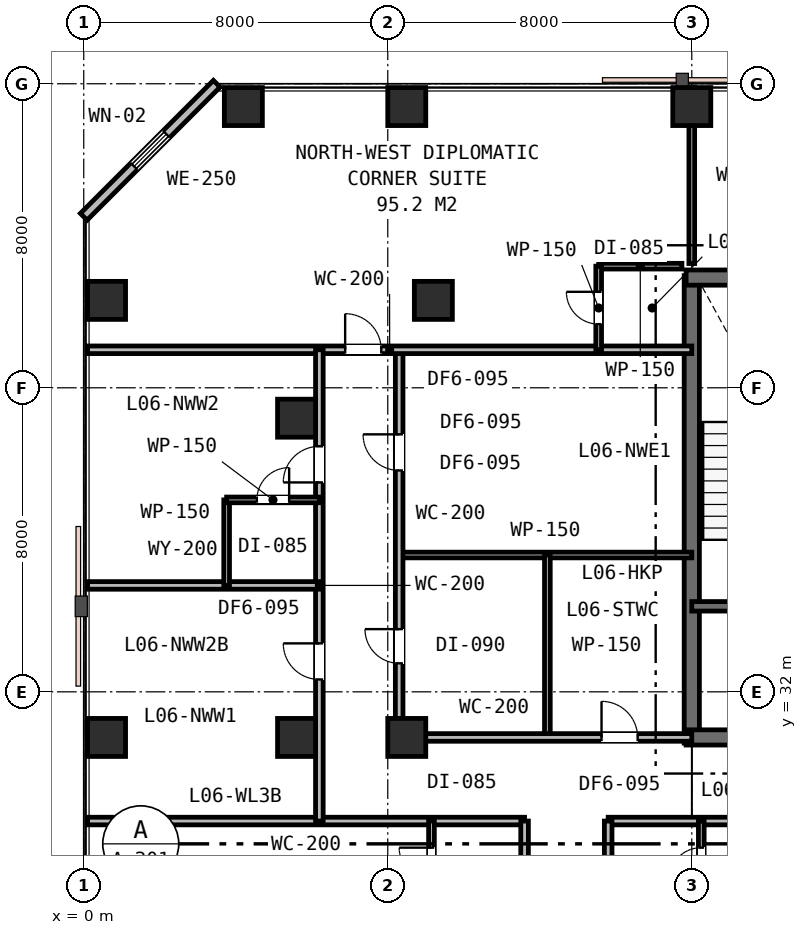
"""IFC4 building model, lengths in metres.
Left out: names, types, materials, properties, quantities, classifications, styles, units other than length and angle.
Written with IfcOpenShell. Run it as: python <this file> out.ifc"""

import sys

from ifc_helpers import new_model, si_unit, direction, frame, frame_2d, origin, origin_2d, place, context, subcontext, project, spatial, rectangle, extrude, element, fill, save


model = new_model("IFC4")
c1 = context("Model", 3, precision=1e-05, world=origin(), true_north=direction((0.0, 1.0)))
c2 = subcontext(c1, "Body", "Model", "MODEL_VIEW")
j1 = project(units=[si_unit("LENGTHUNIT", "METRE"), si_unit("PLANEANGLEUNIT", "RADIAN")], contexts=[c1])
p1 = place(None, origin())
s1 = spatial("IfcSite", under=j1, at=p1, CompositionType="ELEMENT")
p2 = place(p1, origin())
s2 = spatial("IfcBuilding", under=s1, at=p2, CompositionType="ELEMENT")
p3 = place(p2, frame((0.0, 0.0, 29.4)))
s3 = spatial("IfcBuildingStorey", under=s2, at=p3, CompositionType="ELEMENT", Elevation=29.4)
p4 = place(p3, frame((16.0, 30.65, 0.0), z_axis=(0.0, 0.0, 1.0), x_axis=(0.0, 1.0, 0.0)))
e1 = element("IfcWall", 1, at=p4, inside=s3, PredefinedType="SHEAR", context=c2, shape_type="SweptSolid", body=[
    extrude(rectangle(XDim=12.3, YDim=0.4, at=frame_2d((6.15, 0.0))), origin(), (0.0, 0.0, 1.0), 3.6),
])
p5 = place(p3, frame((15.85, 42.9, 0.0), z_axis=(0.0, 0.0, 1.0), x_axis=(1.0, 0.0, 0.0)))
e2 = element("IfcWall", 2, at=p5, inside=s3, PredefinedType="SHEAR", context=c2, shape_type="SweptSolid", body=[
    extrude(rectangle(XDim=24.3, YDim=0.4, at=frame_2d((12.15, 0.0))), origin(), (0.0, 0.0, 1.0), 3.6),
])
p6 = place(p3, frame((15.85, 30.8, 0.0), z_axis=(0.0, 0.0, 1.0), x_axis=(1.0, 0.0, 0.0)))
e3 = element("IfcWall", 3, at=p6, inside=s3, PredefinedType="SHEAR", context=c2, shape_type="SweptSolid", body=[
    extrude(rectangle(XDim=11.2, YDim=0.4, at=frame_2d((5.6, 0.0))), origin(), (0.0, 0.0, 1.0), 3.6),
])
p7 = place(p6, frame((2.45, 0.0, 0.0)))
e4 = element("IfcOpeningElement", 4, at=p7, cuts=e3, PredefinedType="OPENING", context=c2, shape_type="SweptSolid", body=[
    extrude(rectangle(XDim=1.1, YDim=2.15, at=frame_2d((0.55, 1.075))), frame((0.0, 0.21, 0.0), z_axis=(0.0, -1.0, 0.0), x_axis=(1.0, 0.0, 0.0)), (0.0, 0.0, 1.0), 0.42),
])
p8 = place(p3, frame((16.0, 34.25, 0.0), z_axis=(0.0, 0.0, 1.0), x_axis=(1.0, 0.0, 0.0)))
e5 = element("IfcWall", 5, at=p8, inside=s3, PredefinedType="SHEAR", context=c2, shape_type="SweptSolid", body=[
    extrude(rectangle(XDim=6.05, YDim=0.25, at=frame_2d((3.025, 0.0))), origin(), (0.0, 0.0, 1.0), 3.6),
])
p9 = place(p8, frame((1.25, 0.0, 0.0)))
e6 = element("IfcOpeningElement", 6, at=p9, cuts=e5, PredefinedType="OPENING", context=c2, shape_type="SweptSolid", body=[
    extrude(rectangle(XDim=1.0, YDim=2.15, at=frame_2d((0.5, 1.075))), frame((0.0, 0.135, 0.0), z_axis=(0.0, -1.0, 0.0), x_axis=(1.0, 0.0, 0.0)), (0.0, 0.0, 1.0), 0.27),
])
p10 = place(p8, frame((4.2, 0.0, 0.0)))
e7 = element("IfcOpeningElement", 7, at=p10, cuts=e5, PredefinedType="OPENING", context=c2, shape_type="SweptSolid", body=[
    extrude(rectangle(XDim=1.1, YDim=2.15, at=frame_2d((0.55, 1.075))), frame((0.0, 0.135, 0.0), z_axis=(0.0, -1.0, 0.0), x_axis=(1.0, 0.0, 0.0)), (0.0, 0.0, 1.0), 0.27),
])
for number, where, z_axis, x_axis in (
    (8, (5.6, 30.8, 0.0), (0.0, 0.0, 1.0), (1.0, 0.0, 0.0)),
    (9, (5.6, 39.2, 0.0), (0.0, 0.0, 1.0), (1.0, 0.0, 0.0)),
    (10, (8.5, 30.8, 0.0), (0.0, 0.0, 1.0), (1.0, 0.0, 0.0)),
    (11, (9.2, 42.3, 0.0), (0.0, 0.0, 1.0), (1.0, 0.0, 0.0)),
    (12, (0.6, 30.8, 0.0), (0.0, 0.0, 1.0), (1.0, 0.0, 0.0)),
    (13, (0.6, 42.3, 0.0), (0.0, 0.0, 1.0), (1.0, 0.0, 0.0)),
    (14, (4.2, 47.4, 0.0), (0.0, 0.0, 1.0), (1.0, 0.0, 0.0)),
    (15, (8.5, 47.4, 0.0), (0.0, 0.0, 1.0), (1.0, 0.0, 0.0)),
    (16, (16.0, 47.4, 0.0), (0.0, 0.0, 1.0), (1.0, 0.0, 0.0)),
):
    element("IfcColumn", number, at=place(p3, frame(where, z_axis=z_axis, x_axis=x_axis)), inside=s3, PredefinedType="COLUMN", context=c2, shape_type="SweptSolid", body=[
        extrude(rectangle(XDim=1.0, YDim=1.0, at=origin_2d()), origin(), (0.0, 0.0, 1.0), 3.6),
    ])
p11 = place(p3, frame((3.5, 48.0, 0.0), z_axis=(0.0, 0.0, 1.0), x_axis=(-0.707106781187, -0.707106781187, 0.0)))
e17 = element("IfcWall", 17, at=p11, inside=s3, PredefinedType="STANDARD", context=c2, shape_type="SweptSolid", body=[
    extrude(rectangle(XDim=4.95, YDim=0.25, at=frame_2d((2.475, 0.0))), origin(), (0.0, 0.0, 1.0), 3.33),
])
p12 = place(p11, frame((1.875, 0.0, 0.85)))
e18 = element("IfcOpeningElement", 18, at=p12, cuts=e17, PredefinedType="OPENING", context=c2, shape_type="SweptSolid", body=[
    extrude(rectangle(XDim=1.2, YDim=1.6, at=frame_2d((0.6, 0.8))), frame((0.0, 0.135, 0.0), z_axis=(0.0, -1.0, 0.0), x_axis=(1.0, 0.0, 0.0)), (0.0, 0.0, 1.0), 0.27),
])
p13 = place(p3, frame((0.1, 28.6, 0.0), z_axis=(0.0, 0.0, 1.0), x_axis=(1.0, 0.0, 0.0)))
e19 = element("IfcWall", 19, at=p13, inside=s3, PredefinedType="PARTITIONING", context=c2, shape_type="SweptSolid", body=[
    extrude(rectangle(XDim=11.5, YDim=0.2, at=frame_2d((5.75, 0.0))), origin(), (0.0, 0.0, 1.0), 2.68),
])
p14 = place(p3, frame((13.8, 28.6, 0.0), z_axis=(0.0, 0.0, 1.0), x_axis=(1.0, 0.0, 0.0)))
e20 = element("IfcWall", 20, at=p14, inside=s3, PredefinedType="PARTITIONING", context=c2, shape_type="SweptSolid", body=[
    extrude(rectangle(XDim=36.6, YDim=0.2, at=frame_2d((18.3, 0.0))), origin(), (0.0, 0.0, 1.0), 2.68),
])
p15 = place(p14, frame((12.3, 0.0, 0.0)))
e21 = element("IfcOpeningElement", 21, at=p15, cuts=e20, PredefinedType="OPENING", context=c2, shape_type="SweptSolid", body=[
    extrude(rectangle(XDim=0.95, YDim=2.15, at=frame_2d((0.475, 1.075))), frame((0.0, 0.11, 0.0), z_axis=(0.0, -1.0, 0.0), x_axis=(1.0, 0.0, 0.0)), (0.0, 0.0, 1.0), 0.22),
])
p16 = place(p14, frame((20.075, 0.0, 0.0)))
e22 = element("IfcOpeningElement", 22, at=p16, cuts=e20, PredefinedType="OPENING", context=c2, shape_type="SweptSolid", body=[
    extrude(rectangle(XDim=0.95, YDim=2.15, at=frame_2d((0.475, 1.075))), frame((0.0, 0.11, 0.0), z_axis=(0.0, -1.0, 0.0), x_axis=(1.0, 0.0, 0.0)), (0.0, 0.0, 1.0), 0.22),
])
p17 = place(p14, frame((26.829, 0.0, 0.0)))
e23 = element("IfcOpeningElement", 23, at=p17, cuts=e20, PredefinedType="OPENING", context=c2, shape_type="SweptSolid", body=[
    extrude(rectangle(XDim=0.95, YDim=2.15, at=frame_2d((0.475, 1.075))), frame((0.0, 0.11, 0.0), z_axis=(0.0, -1.0, 0.0), x_axis=(1.0, 0.0, 0.0)), (0.0, 0.0, 1.0), 0.22),
])
p18 = place(p14, frame((32.669, 0.0, 0.0)))
e24 = element("IfcOpeningElement", 24, at=p18, cuts=e20, PredefinedType="OPENING", context=c2, shape_type="SweptSolid", body=[
    extrude(rectangle(XDim=0.95, YDim=2.15, at=frame_2d((0.475, 1.075))), frame((0.0, 0.11, 0.0), z_axis=(0.0, -1.0, 0.0), x_axis=(1.0, 0.0, 0.0)), (0.0, 0.0, 1.0), 0.22),
])
p19 = place(p3, frame((8.3, 35.6, 0.0), z_axis=(0.0, 0.0, 1.0), x_axis=(1.0, 0.0, 0.0)))
e25 = element("IfcWall", 25, at=p19, inside=s3, PredefinedType="PARTITIONING", context=c2, shape_type="SweptSolid", body=[
    extrude(rectangle(XDim=7.7, YDim=0.15, at=frame_2d((3.85, 0.0))), origin(), (0.0, 0.0, 1.0), 2.68),
])
p20 = place(p3, frame((12.2, 30.8, 0.0), z_axis=(0.0, 0.0, 1.0), x_axis=(0.0, 1.0, 0.0)))
e26 = element("IfcWall", 26, at=p20, inside=s3, PredefinedType="PARTITIONING", context=c2, shape_type="SweptSolid", body=[
    extrude(rectangle(XDim=4.8, YDim=0.15, at=frame_2d((2.4, 0.0))), origin(), (0.0, 0.0, 1.0), 2.68),
])
p21 = place(p3, frame((8.3, 30.8, 0.0), z_axis=(0.0, 0.0, 1.0), x_axis=(1.0, 0.0, 0.0)))
e27 = element("IfcWall", 27, at=p21, inside=s3, PredefinedType="PARTITIONING", context=c2, shape_type="SweptSolid", body=[
    extrude(rectangle(XDim=7.7, YDim=0.2, at=frame_2d((3.85, 0.0))), origin(), (0.0, 0.0, 1.0), 2.68),
])
p22 = place(p21, frame((5.325, 0.0, 0.0)))
e28 = element("IfcOpeningElement", 28, at=p22, cuts=e27, PredefinedType="OPENING", context=c2, shape_type="SweptSolid", body=[
    extrude(rectangle(XDim=0.95, YDim=2.15, at=frame_2d((0.475, 1.075))), frame((0.0, 0.11, 0.0), z_axis=(0.0, -1.0, 0.0), x_axis=(1.0, 0.0, 0.0)), (0.0, 0.0, 1.0), 0.22),
])
p23 = place(p3, frame((8.3, 30.8, 0.0), z_axis=(0.0, 0.0, 1.0), x_axis=(0.0, 1.0, 0.0)))
e29 = element("IfcWall", 29, at=p23, inside=s3, PredefinedType="PARTITIONING", context=c2, shape_type="SweptSolid", body=[
    extrude(rectangle(XDim=10.2, YDim=0.2, at=frame_2d((5.1, 0.0))), origin(), (0.0, 0.0, 1.0), 2.68),
])
p24 = place(p23, frame((1.95, 0.0, 0.0)))
e30 = element("IfcOpeningElement", 30, at=p24, cuts=e29, PredefinedType="OPENING", context=c2, shape_type="SweptSolid", body=[
    extrude(rectangle(XDim=0.9, YDim=2.15, at=frame_2d((0.45, 1.075))), frame((0.0, 0.11, 0.0), z_axis=(0.0, -1.0, 0.0), x_axis=(1.0, 0.0, 0.0)), (0.0, 0.0, 1.0), 0.22),
])
p25 = place(p23, frame((7.025, 0.0, 0.0)))
e31 = element("IfcOpeningElement", 31, at=p25, cuts=e29, PredefinedType="OPENING", context=c2, shape_type="SweptSolid", body=[
    extrude(rectangle(XDim=0.95, YDim=2.15, at=frame_2d((0.475, 1.075))), frame((0.0, 0.11, 0.0), z_axis=(0.0, -1.0, 0.0), x_axis=(1.0, 0.0, 0.0)), (0.0, 0.0, 1.0), 0.22),
])
p26 = place(p3, frame((0.1, 41.0, 0.0), z_axis=(0.0, 0.0, 1.0), x_axis=(1.0, 0.0, 0.0)))
e32 = element("IfcWall", 32, at=p26, inside=s3, PredefinedType="PARTITIONING", context=c2, shape_type="SweptSolid", body=[
    extrude(rectangle(XDim=15.9, YDim=0.2, at=frame_2d((7.95, 0.0))), origin(), (0.0, 0.0, 1.0), 2.68),
])
p27 = place(p26, frame((6.779, 0.0, 0.0)))
e33 = element("IfcOpeningElement", 33, at=p27, cuts=e32, PredefinedType="OPENING", context=c2, shape_type="SweptSolid", body=[
    extrude(rectangle(XDim=0.95, YDim=2.15, at=frame_2d((0.475, 1.075))), frame((0.0, 0.11, 0.0), z_axis=(0.0, -1.0, 0.0), x_axis=(1.0, 0.0, 0.0)), (0.0, 0.0, 1.0), 0.22),
])
p28 = place(p3, frame((13.55, 43.2, 0.0), z_axis=(0.0, 0.0, 1.0), x_axis=(1.0, 0.0, 0.0)))
e34 = element("IfcWall", 34, at=p28, inside=s3, PredefinedType="PARTITIONING", context=c2, shape_type="SweptSolid", body=[
    extrude(rectangle(XDim=2.19, YDim=0.15, at=frame_2d((1.095, 0.0))), origin(), (0.0, 0.0, 1.0), 3.33),
])
p29 = place(p3, frame((13.55, 41.0, 0.0), z_axis=(0.0, 0.0, 1.0), x_axis=(0.0, 1.0, 0.0)))
e35 = element("IfcWall", 35, at=p29, inside=s3, PredefinedType="PARTITIONING", context=c2, shape_type="SweptSolid", body=[
    extrude(rectangle(XDim=2.2, YDim=0.15, at=frame_2d((1.1, 0.0))), origin(), (0.0, 0.0, 1.0), 3.33),
])
p30 = place(p29, frame((0.675, 0.0, 0.0)))
e36 = element("IfcOpeningElement", 36, at=p30, cuts=e35, PredefinedType="OPENING", context=c2, shape_type="SweptSolid", body=[
    extrude(rectangle(XDim=0.85, YDim=2.15, at=frame_2d((0.425, 1.075))), frame((0.0, 0.085, 0.0), z_axis=(0.0, -1.0, 0.0), x_axis=(1.0, 0.0, 0.0)), (0.0, 0.0, 1.0), 0.17),
])
p31 = place(p3, frame((6.2, 28.6, 0.0), z_axis=(0.0, 0.0, 1.0), x_axis=(0.0, 1.0, 0.0)))
e37 = element("IfcWall", 37, at=p31, inside=s3, PredefinedType="PARTITIONING", context=c2, shape_type="SweptSolid", body=[
    extrude(rectangle(XDim=12.4, YDim=0.2, at=frame_2d((6.2, 0.0))), origin(), (0.0, 0.0, 1.0), 2.68),
])
p32 = place(p31, frame((3.725, 0.0, 0.0)))
e38 = element("IfcOpeningElement", 38, at=p32, cuts=e37, PredefinedType="OPENING", context=c2, shape_type="SweptSolid", body=[
    extrude(rectangle(XDim=0.95, YDim=2.15, at=frame_2d((0.475, 1.075))), frame((0.0, 0.11, 0.0), z_axis=(0.0, -1.0, 0.0), x_axis=(1.0, 0.0, 0.0)), (0.0, 0.0, 1.0), 0.22),
])
p33 = place(p31, frame((8.91, 0.0, 0.0)))
e39 = element("IfcOpeningElement", 39, at=p33, cuts=e37, PredefinedType="OPENING", context=c2, shape_type="SweptSolid", body=[
    extrude(rectangle(XDim=0.95, YDim=2.15, at=frame_2d((0.475, 1.075))), frame((0.0, 0.11, 0.0), z_axis=(0.0, -1.0, 0.0), x_axis=(1.0, 0.0, 0.0)), (0.0, 0.0, 1.0), 0.22),
])
p34 = place(p3, frame((0.1, 34.8, 0.0), z_axis=(0.0, 0.0, 1.0), x_axis=(1.0, 0.0, 0.0)))
e40 = element("IfcWall", 40, at=p34, inside=s3, PredefinedType="PARTITIONING", context=c2, shape_type="SweptSolid", body=[
    extrude(rectangle(XDim=6.1, YDim=0.2, at=frame_2d((3.05, 0.0))), origin(), (0.0, 0.0, 1.0), 2.68),
])
p35 = place(p3, frame((3.76, 34.8, 0.0), z_axis=(0.0, 0.0, 1.0), x_axis=(0.0, 1.0, 0.0)))
e41 = element("IfcWall", 41, at=p35, inside=s3, PredefinedType="PARTITIONING", context=c2, shape_type="SweptSolid", body=[
    extrude(rectangle(XDim=2.25, YDim=0.15, at=frame_2d((1.125, 0.0))), origin(), (0.0, 0.0, 1.0), 3.33),
])
p36 = place(p3, frame((3.76, 37.05, 0.0), z_axis=(0.0, 0.0, 1.0), x_axis=(1.0, 0.0, 0.0)))
e42 = element("IfcWall", 42, at=p36, inside=s3, PredefinedType="PARTITIONING", context=c2, shape_type="SweptSolid", body=[
    extrude(rectangle(XDim=2.44, YDim=0.15, at=frame_2d((1.22, 0.0))), origin(), (0.0, 0.0, 1.0), 2.68),
])
p37 = place(p36, frame((0.795, 0.0, 0.0)))
e43 = element("IfcOpeningElement", 43, at=p37, cuts=e42, PredefinedType="OPENING", context=c2, shape_type="SweptSolid", body=[
    extrude(rectangle(XDim=0.85, YDim=2.15, at=frame_2d((0.425, 1.075))), frame((0.0, 0.085, 0.0), z_axis=(0.0, -1.0, 0.0), x_axis=(1.0, 0.0, 0.0)), (0.0, 0.0, 1.0), 0.17),
])
p38 = place(p3, frame((16.0, 43.27, 0.0), z_axis=(0.0, 0.0, 1.0), x_axis=(0.0, 1.0, 0.0)))
e44 = element("IfcWall", 44, at=p38, inside=s3, PredefinedType="PARTITIONING", context=c2, shape_type="SweptSolid", body=[
    extrude(rectangle(XDim=4.63, YDim=0.15, at=frame_2d((2.315, 0.0))), origin(), (0.0, 0.0, 1.0), 2.87),
])
p39 = place(p3, frame((11.6, 5.6, 0.0), z_axis=(0.0, 0.0, 1.0), x_axis=(0.0, 1.0, 0.0)))
e45 = element("IfcWall", 45, at=p39, inside=s3, PredefinedType="PARTITIONING", context=c2, shape_type="SweptSolid", body=[
    extrude(rectangle(XDim=23.0, YDim=0.2, at=frame_2d((11.5, 0.0))), origin(), (0.0, 0.0, 1.0), 2.68),
])
p40 = place(p39, frame((2.19, 0.0, 0.0)))
e46 = element("IfcOpeningElement", 46, at=p40, cuts=e45, PredefinedType="OPENING", context=c2, shape_type="SweptSolid", body=[
    extrude(rectangle(XDim=0.95, YDim=2.15, at=frame_2d((0.475, 1.075))), frame((0.0, 0.11, 0.0), z_axis=(0.0, -1.0, 0.0), x_axis=(1.0, 0.0, 0.0)), (0.0, 0.0, 1.0), 0.22),
])
p41 = place(p39, frame((9.29, 0.0, 0.0)))
e47 = element("IfcOpeningElement", 47, at=p41, cuts=e45, PredefinedType="OPENING", context=c2, shape_type="SweptSolid", body=[
    extrude(rectangle(XDim=0.95, YDim=2.15, at=frame_2d((0.475, 1.075))), frame((0.0, 0.11, 0.0), z_axis=(0.0, -1.0, 0.0), x_axis=(1.0, 0.0, 0.0)), (0.0, 0.0, 1.0), 0.22),
])
p42 = place(p39, frame((16.64, 0.0, 0.0)))
e48 = element("IfcOpeningElement", 48, at=p42, cuts=e45, PredefinedType="OPENING", context=c2, shape_type="SweptSolid", body=[
    extrude(rectangle(XDim=0.95, YDim=2.15, at=frame_2d((0.475, 1.075))), frame((0.0, 0.11, 0.0), z_axis=(0.0, -1.0, 0.0), x_axis=(1.0, 0.0, 0.0)), (0.0, 0.0, 1.0), 0.22),
])
p43 = place(p3, frame((13.8, 5.6, 0.0), z_axis=(0.0, 0.0, 1.0), x_axis=(0.0, 1.0, 0.0)))
e49 = element("IfcWall", 49, at=p43, inside=s3, PredefinedType="PARTITIONING", context=c2, shape_type="SweptSolid", body=[
    extrude(rectangle(XDim=23.0, YDim=0.2, at=frame_2d((11.5, 0.0))), origin(), (0.0, 0.0, 1.0), 2.68),
])
p44 = place(p43, frame((0.752, 0.0, 0.0)))
e50 = element("IfcOpeningElement", 50, at=p44, cuts=e49, PredefinedType="OPENING", context=c2, shape_type="SweptSolid", body=[
    extrude(rectangle(XDim=0.95, YDim=2.15, at=frame_2d((0.475, 1.075))), frame((0.0, 0.11, 0.0), z_axis=(0.0, -1.0, 0.0), x_axis=(1.0, 0.0, 0.0)), (0.0, 0.0, 1.0), 0.22),
])
p45 = place(p43, frame((9.29, 0.0, 0.0)))
e51 = element("IfcOpeningElement", 51, at=p45, cuts=e49, PredefinedType="OPENING", context=c2, shape_type="SweptSolid", body=[
    extrude(rectangle(XDim=0.95, YDim=2.15, at=frame_2d((0.475, 1.075))), frame((0.0, 0.11, 0.0), z_axis=(0.0, -1.0, 0.0), x_axis=(1.0, 0.0, 0.0)), (0.0, 0.0, 1.0), 0.22),
])
p46 = place(p43, frame((16.494, 0.0, 0.0)))
e52 = element("IfcOpeningElement", 52, at=p46, cuts=e49, PredefinedType="OPENING", context=c2, shape_type="SweptSolid", body=[
    extrude(rectangle(XDim=0.95, YDim=2.15, at=frame_2d((0.475, 1.075))), frame((0.0, 0.11, 0.0), z_axis=(0.0, -1.0, 0.0), x_axis=(1.0, 0.0, 0.0)), (0.0, 0.0, 1.0), 0.22),
])
p47 = place(p3, frame((9.15, 26.35, 0.0), z_axis=(0.0, 0.0, 1.0), x_axis=(0.0, 1.0, 0.0)))
e53 = element("IfcWall", 53, at=p47, inside=s3, PredefinedType="PARTITIONING", context=c2, shape_type="SweptSolid", body=[
    extrude(rectangle(XDim=2.25, YDim=0.15, at=frame_2d((1.125, 0.0))), origin(), (0.0, 0.0, 1.0), 3.33),
])
p48 = place(p47, frame((0.7, 0.0, 0.0)))
e54 = element("IfcOpeningElement", 54, at=p48, cuts=e53, PredefinedType="OPENING", context=c2, shape_type="SweptSolid", body=[
    extrude(rectangle(XDim=0.85, YDim=2.15, at=frame_2d((0.425, 1.075))), frame((0.0, 0.085, 0.0), z_axis=(0.0, -1.0, 0.0), x_axis=(1.0, 0.0, 0.0)), (0.0, 0.0, 1.0), 0.17),
])
p49 = place(p3, frame((16.25, 26.35, 0.0), z_axis=(0.0, 0.0, 1.0), x_axis=(0.0, 1.0, 0.0)))
e55 = element("IfcWall", 55, at=p49, inside=s3, PredefinedType="PARTITIONING", context=c2, shape_type="SweptSolid", body=[
    extrude(rectangle(XDim=2.25, YDim=0.15, at=frame_2d((1.125, 0.0))), origin(), (0.0, 0.0, 1.0), 2.68),
])
p50 = place(p49, frame((0.7, 0.0, 0.0)))
e56 = element("IfcOpeningElement", 56, at=p50, cuts=e55, PredefinedType="OPENING", context=c2, shape_type="SweptSolid", body=[
    extrude(rectangle(XDim=0.85, YDim=2.15, at=frame_2d((0.425, 1.075))), frame((0.0, 0.085, 0.0), z_axis=(0.0, -1.0, 0.0), x_axis=(1.0, 0.0, 0.0)), (0.0, 0.0, 1.0), 0.17),
])
p51 = place(p12, origin())
e57 = element("IfcWindow", 57, at=p51, inside=s3, PartitioningType="SINGLE_PANEL", PredefinedType="WINDOW", context=c2, shape_type="SweptSolid", body=[
    extrude(rectangle(XDim=1.2, YDim=1.6, at=frame_2d((0.6, 0.8))), frame((0.0, 0.03, 0.0), z_axis=(0.0, -1.0, 0.0), x_axis=(1.0, 0.0, 0.0)), (0.0, 0.0, 1.0), 0.06),
])
fill(e18, e57)
p52 = place(p22, origin())
e58 = element("IfcDoor", 58, at=p52, inside=s3, OperationType="SINGLE_SWING_LEFT", PredefinedType="DOOR", context=c2, shape_type="SweptSolid", body=[
    extrude(rectangle(XDim=0.95, YDim=2.15, at=frame_2d((0.475, 1.075))), frame((0.0, 0.025, 0.0), z_axis=(0.0, -1.0, 0.0), x_axis=(1.0, 0.0, 0.0)), (0.0, 0.0, 1.0), 0.05),
])
fill(e28, e58)
p53 = place(p24, origin())
e59 = element("IfcDoor", 59, at=p53, inside=s3, OperationType="SINGLE_SWING_RIGHT", PredefinedType="DOOR", context=c2, shape_type="SweptSolid", body=[
    extrude(rectangle(XDim=0.9, YDim=2.15, at=frame_2d((0.45, 1.075))), frame((0.0, 0.025, 0.0), z_axis=(0.0, -1.0, 0.0), x_axis=(1.0, 0.0, 0.0)), (0.0, 0.0, 1.0), 0.05),
])
fill(e30, e59)
p54 = place(p27, origin())
e60 = element("IfcDoor", 60, at=p54, inside=s3, OperationType="SINGLE_SWING_LEFT", PredefinedType="DOOR", context=c2, shape_type="SweptSolid", body=[
    extrude(rectangle(XDim=0.95, YDim=2.15, at=frame_2d((0.475, 1.075))), frame((0.0, 0.025, 0.0), z_axis=(0.0, -1.0, 0.0), x_axis=(1.0, 0.0, 0.0)), (0.0, 0.0, 1.0), 0.05),
])
fill(e33, e60)
p55 = place(p30, origin())
e61 = element("IfcDoor", 61, at=p55, inside=s3, OperationType="SINGLE_SWING_RIGHT", PredefinedType="DOOR", context=c2, shape_type="SweptSolid", body=[
    extrude(rectangle(XDim=0.85, YDim=2.15, at=frame_2d((0.425, 1.075))), frame((0.0, 0.025, 0.0), z_axis=(0.0, -1.0, 0.0), x_axis=(1.0, 0.0, 0.0)), (0.0, 0.0, 1.0), 0.05),
])
fill(e36, e61)
p56 = place(p32, origin())
e62 = element("IfcDoor", 62, at=p56, inside=s3, OperationType="SINGLE_SWING_RIGHT", PredefinedType="DOOR", context=c2, shape_type="SweptSolid", body=[
    extrude(rectangle(XDim=0.95, YDim=2.15, at=frame_2d((0.475, 1.075))), frame((0.0, 0.025, 0.0), z_axis=(0.0, -1.0, 0.0), x_axis=(1.0, 0.0, 0.0)), (0.0, 0.0, 1.0), 0.05),
])
fill(e38, e62)
p57 = place(p33, origin())
e63 = element("IfcDoor", 63, at=p57, inside=s3, OperationType="SINGLE_SWING_LEFT", PredefinedType="DOOR", context=c2, shape_type="SweptSolid", body=[
    extrude(rectangle(XDim=0.95, YDim=2.15, at=frame_2d((0.475, 1.075))), frame((0.0, 0.025, 0.0), z_axis=(0.0, -1.0, 0.0), x_axis=(1.0, 0.0, 0.0)), (0.0, 0.0, 1.0), 0.05),
])
fill(e39, e63)
p58 = place(p37, origin())
e64 = element("IfcDoor", 64, at=p58, inside=s3, OperationType="SINGLE_SWING_RIGHT", PredefinedType="DOOR", context=c2, shape_type="SweptSolid", body=[
    extrude(rectangle(XDim=0.85, YDim=2.15, at=frame_2d((0.425, 1.075))), frame((0.0, 0.025, 0.0), z_axis=(0.0, -1.0, 0.0), x_axis=(1.0, 0.0, 0.0)), (0.0, 0.0, 1.0), 0.05),
])
fill(e43, e64)
p59 = place(p25, origin())
e65 = element("IfcDoor", 65, at=p59, inside=s3, OperationType="SINGLE_SWING_RIGHT", PredefinedType="DOOR", context=c2, shape_type="SweptSolid", body=[
    extrude(rectangle(XDim=0.95, YDim=2.15, at=frame_2d((0.475, 1.075))), frame((0.0, 0.025, 0.0), z_axis=(0.0, -1.0, 0.0), x_axis=(1.0, 0.0, 0.0)), (0.0, 0.0, 1.0), 0.05),
])
fill(e31, e65)
p60 = place(p48, origin())
e66 = element("IfcDoor", 66, at=p60, inside=s3, OperationType="SINGLE_SWING_RIGHT", PredefinedType="DOOR", context=c2, shape_type="SweptSolid", body=[
    extrude(rectangle(XDim=0.85, YDim=2.15, at=frame_2d((0.425, 1.075))), frame((0.0, 0.025, 0.0), z_axis=(0.0, -1.0, 0.0), x_axis=(1.0, 0.0, 0.0)), (0.0, 0.0, 1.0), 0.05),
])
fill(e54, e66)
p61 = place(p50, origin())
e67 = element("IfcDoor", 67, at=p61, inside=s3, OperationType="SINGLE_SWING_LEFT", PredefinedType="DOOR", context=c2, shape_type="SweptSolid", body=[
    extrude(rectangle(XDim=0.85, YDim=2.15, at=frame_2d((0.425, 1.075))), frame((0.0, 0.025, 0.0), z_axis=(0.0, -1.0, 0.0), x_axis=(1.0, 0.0, 0.0)), (0.0, 0.0, 1.0), 0.05),
])
fill(e56, e67)
save(model, sys.argv[1])
